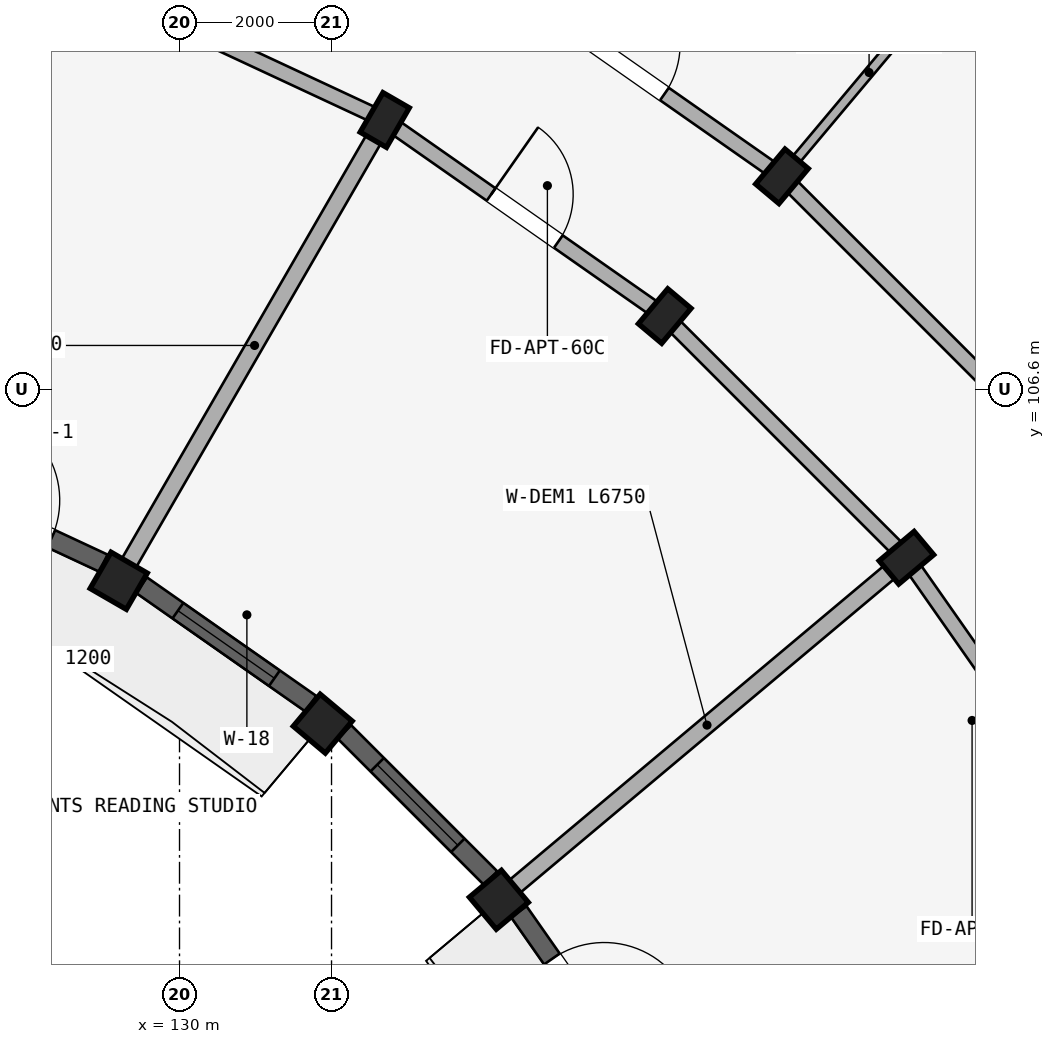
"""IFC4 building model, lengths in metres.
Left out: names, types, materials, properties, quantities, classifications, styles, units other than length and angle.
Written with IfcOpenShell. Run it as: python <this file> out.ifc"""

import sys

from ifc_helpers import new_model, si_unit, direction, frame, frame_2d, origin, origin_2d, place, context, subcontext, project, spatial, rectangle, extrude, element, fill, save


model = new_model("IFC4")
c1 = context("Model", 3, precision=1e-05, world=origin(), true_north=direction((0.0, 1.0)))
c2 = subcontext(c1, "Body", "Model", "MODEL_VIEW")
j1 = project(units=[si_unit("LENGTHUNIT", "METRE"), si_unit("PLANEANGLEUNIT", "RADIAN")], contexts=[c1])
p1 = place(None, origin())
s1 = spatial("IfcSite", under=j1, at=p1, CompositionType="ELEMENT")
p2 = place(p1, origin())
s2 = spatial("IfcBuilding", under=s1, at=p2, CompositionType="ELEMENT")
p3 = place(p2, frame((0.0, 0.0, 40.2)))
s3 = spatial("IfcBuildingStorey", under=s2, at=p3, CompositionType="ELEMENT", Elevation=40.2)
p4 = place(p3, frame((129.2, 104.081, 0.0), z_axis=(0.0, 0.0, 1.0), x_axis=(-0.866025403784, 0.5, 0.0)))
e1 = element("IfcColumn", 1, at=p4, inside=s3, PredefinedType="COLUMN", context=c2, shape_type="SweptSolid", body=[
    extrude(rectangle(XDim=0.55, YDim=0.55, at=origin_2d()), origin(), (0.0, 0.0, 1.0), 2.91),
])
p5 = place(p3, frame((132.7, 110.144, 0.0), z_axis=(0.0, 0.0, 1.0), x_axis=(-0.866025403784, 0.5, 0.0)))
e2 = element("IfcColumn", 2, at=p5, inside=s3, PredefinedType="COLUMN", context=c2, shape_type="SweptSolid", body=[
    extrude(rectangle(XDim=0.4, YDim=0.6, at=origin_2d()), origin(), (0.0, 0.0, 1.0), 2.91),
])
p6 = place(p3, frame((131.885, 102.202, 0.0), z_axis=(0.0, 0.0, 1.0), x_axis=(-0.766044443119, 0.642787609687, 0.0)))
e3 = element("IfcColumn", 3, at=p6, inside=s3, PredefinedType="COLUMN", context=c2, shape_type="SweptSolid", body=[
    extrude(rectangle(XDim=0.55, YDim=0.55, at=origin_2d()), origin(), (0.0, 0.0, 1.0), 2.91),
])
for number, where, z_axis, x_axis in (
    (4, (136.384, 107.564, 0.0), (0.0, 0.0, 1.0), (-0.766, 0.643, 0.0)),
    (5, (137.927, 109.402, 0.0), (0.0, 0.0, 1.0), (-0.766, 0.643, 0.0)),
):
    element("IfcColumn", number, at=place(p3, frame(where, z_axis=z_axis, x_axis=x_axis)), inside=s3, PredefinedType="COLUMN", context=c2, shape_type="SweptSolid", body=[
        extrude(rectangle(XDim=0.4, YDim=0.6, at=origin_2d()), origin(), (0.0, 0.0, 1.0), 2.91),
    ])
p7 = place(p3, frame((134.202, 99.885, 0.0), z_axis=(0.0, 0.0, 1.0), x_axis=(-0.642787609687, 0.766044443119, 0.0)))
e6 = element("IfcColumn", 6, at=p7, inside=s3, PredefinedType="COLUMN", context=c2, shape_type="SweptSolid", body=[
    extrude(rectangle(XDim=0.55, YDim=0.55, at=origin_2d()), origin(), (0.0, 0.0, 1.0), 2.91),
])
p8 = place(p3, frame((139.564, 104.384, 0.0), z_axis=(0.0, 0.0, 1.0), x_axis=(-0.642787609687, 0.766044443119, 0.0)))
e7 = element("IfcColumn", 7, at=p8, inside=s3, PredefinedType="COLUMN", context=c2, shape_type="SweptSolid", body=[
    extrude(rectangle(XDim=0.4, YDim=0.6, at=origin_2d()), origin(), (0.0, 0.0, 1.0), 2.91),
])
p9 = place(p3, frame((128.624, 112.044, 0.0), z_axis=(0.0, 0.0, 1.0), x_axis=(0.906307919131, -0.422617978463, 0.0)))
e8 = element("IfcWall", 8, at=p9, inside=s3, PredefinedType="STANDARD", context=c2, shape_type="SweptSolid", body=[
    extrude(rectangle(XDim=4.497, YDim=0.2, at=frame_2d((2.249, 0.0))), origin(), (0.0, 0.0, 1.0), 2.352),
])
p10 = place(p3, frame((132.7, 110.144, 0.0), z_axis=(0.0, 0.0, 1.0), x_axis=(0.819155404658, -0.573571637217, 0.0)))
e9 = element("IfcWall", 9, at=p10, inside=s3, PredefinedType="STANDARD", context=c2, shape_type="SweptSolid", body=[
    extrude(rectangle(XDim=4.497, YDim=0.2, at=frame_2d((2.249, 0.0))), origin(), (0.0, 0.0, 1.0), 2.352),
])
p11 = place(p10, frame((1.709, 0.0, 0.0)))
e10 = element("IfcOpeningElement", 10, at=p11, cuts=e9, PredefinedType="OPENING", context=c2, shape_type="SweptSolid", body=[
    extrude(rectangle(XDim=1.08, YDim=2.15, at=frame_2d((0.54, 1.075))), frame((0.0, 0.11, 0.0), z_axis=(0.0, -1.0, 0.0), x_axis=(1.0, 0.0, 0.0)), (0.0, 0.0, 1.0), 0.22),
])
p12 = place(p3, frame((133.9, 112.222, 0.0), z_axis=(0.0, 0.0, 1.0), x_axis=(0.819140911474, -0.573592335331, 0.0)))
e11 = element("IfcWall", 11, at=p12, inside=s3, PredefinedType="STANDARD", context=c2, shape_type="SweptSolid", body=[
    extrude(rectangle(XDim=4.916, YDim=0.2, at=frame_2d((2.458, 0.0))), origin(), (0.0, 0.0, 1.0), 2.352),
])
p13 = place(p12, frame((1.888, 0.0, 0.0)))
e12 = element("IfcOpeningElement", 12, at=p13, cuts=e11, PredefinedType="OPENING", context=c2, shape_type="SweptSolid", body=[
    extrude(rectangle(XDim=1.14, YDim=2.15, at=frame_2d((0.57, 1.075))), frame((0.0, 0.11, 0.0), z_axis=(0.0, -1.0, 0.0), x_axis=(1.0, 0.0, 0.0)), (0.0, 0.0, 1.0), 0.22),
])
p14 = place(p3, frame((136.384, 107.564, 0.0), z_axis=(0.0, 0.0, 1.0), x_axis=(0.707106781187, -0.707106781187, 0.0)))
e13 = element("IfcWall", 13, at=p14, inside=s3, PredefinedType="STANDARD", context=c2, shape_type="SweptSolid", body=[
    extrude(rectangle(XDim=4.497, YDim=0.2, at=frame_2d((2.249, 0.0))), origin(), (0.0, 0.0, 1.0), 2.352),
])
p15 = place(p3, frame((137.927, 109.402, 0.0), z_axis=(0.0, 0.0, 1.0), x_axis=(0.707106781187, -0.707106781187, 0.0)))
e14 = element("IfcWall", 14, at=p15, inside=s3, PredefinedType="STANDARD", context=c2, shape_type="SweptSolid", body=[
    extrude(rectangle(XDim=4.916, YDim=0.2, at=frame_2d((2.458, 0.0))), origin(), (0.0, 0.0, 1.0), 2.352),
])
p16 = place(p3, frame((139.564, 104.384, 0.0), z_axis=(0.0, 0.0, 1.0), x_axis=(0.573571637217, -0.819155404658, 0.0)))
e15 = element("IfcWall", 15, at=p16, inside=s3, PredefinedType="STANDARD", context=c2, shape_type="SweptSolid", body=[
    extrude(rectangle(XDim=4.497, YDim=0.2, at=frame_2d((2.249, 0.0))), origin(), (0.0, 0.0, 1.0), 2.352),
])
p17 = place(p16, frame((1.749, 0.0, 0.0)))
e16 = element("IfcOpeningElement", 16, at=p17, cuts=e15, PredefinedType="OPENING", context=c2, shape_type="SweptSolid", body=[
    extrude(rectangle(XDim=1.0, YDim=2.15, at=frame_2d((0.5, 1.075))), frame((0.0, 0.11, 0.0), z_axis=(0.0, -1.0, 0.0), x_axis=(1.0, 0.0, 0.0)), (0.0, 0.0, 1.0), 0.22),
])
p18 = place(p3, frame((129.3, 104.254, 0.0), z_axis=(0.0, 0.0, 1.0), x_axis=(0.499997969693, 0.866026575979, 0.0)))
e17 = element("IfcWall", 17, at=p18, inside=s3, PredefinedType="STANDARD", context=c2, shape_type="SweptSolid", body=[
    extrude(rectangle(XDim=6.75, YDim=0.22, at=frame_2d((3.375, 0.0))), origin(), (0.0, 0.0, 1.0), 2.352),
])
p19 = place(p3, frame((137.991, 109.479, 0.0), z_axis=(0.0, 0.0, 1.0), x_axis=(0.642771313427, 0.766058117009, 0.0)))
e18 = element("IfcWall", 18, at=p19, inside=s3, PredefinedType="PARTITIONING", context=c2, shape_type="SweptSolid", body=[
    extrude(rectangle(XDim=6.22, YDim=0.125, at=frame_2d((3.11, 0.0))), origin(), (0.0, 0.0, 1.0), 2.352),
])
p20 = place(p19, frame((4.45, 0.0, 0.0)))
e19 = element("IfcOpeningElement", 19, at=p20, cuts=e18, PredefinedType="OPENING", context=c2, shape_type="SweptSolid", body=[
    extrude(rectangle(XDim=0.8, YDim=2.1, at=frame_2d((0.4, 1.05))), frame((0.0, 0.073, 0.0), z_axis=(0.0, -1.0, 0.0), x_axis=(1.0, 0.0, 0.0)), (0.0, 0.0, 1.0), 0.145),
])
p21 = place(p3, frame((134.355, 100.013, 0.0), z_axis=(0.0, 0.0, 1.0), x_axis=(0.766046761698, 0.642784846501, 0.0)))
e20 = element("IfcWall", 20, at=p21, inside=s3, PredefinedType="STANDARD", context=c2, shape_type="SweptSolid", body=[
    extrude(rectangle(XDim=6.75, YDim=0.22, at=frame_2d((3.375, 0.0))), origin(), (0.0, 0.0, 1.0), 2.352),
])
p22 = place(p3, frame((126.535, 105.462, 0.0), z_axis=(0.0, 0.0, 1.0), x_axis=(0.906302358412, -0.422629903269, 0.0)))
e21 = element("IfcWall", 21, at=p22, inside=s3, PredefinedType="STANDARD", context=c2, shape_type="SweptSolid", body=[
    extrude(rectangle(XDim=2.72, YDim=0.25, at=frame_2d((1.36, 0.0))), origin(), (0.0, 0.0, 1.0), 2.452),
])
p23 = place(p22, frame((0.76, 0.0, 0.0)))
e22 = element("IfcOpeningElement", 22, at=p23, cuts=e21, PredefinedType="OPENING", context=c2, shape_type="SweptSolid", body=[
    extrude(rectangle(XDim=1.2, YDim=2.15, at=frame_2d((0.6, 1.075))), frame((0.0, 0.135, 0.0), z_axis=(0.0, -1.0, 0.0), x_axis=(1.0, 0.0, 0.0)), (0.0, 0.0, 1.0), 0.27),
])
p24 = place(p3, frame((129.5, 104.024, 0.0), z_axis=(0.0, 0.0, 1.0), x_axis=(0.819126475299, -0.573612950921, 0.0)))
e23 = element("IfcWall", 23, at=p24, inside=s3, PredefinedType="STANDARD", context=c2, shape_type="SweptSolid", body=[
    extrude(rectangle(XDim=2.72, YDim=0.25, at=frame_2d((1.36, 0.0))), origin(), (0.0, 0.0, 1.0), 2.452),
])
p25 = place(p24, frame((0.585, 0.0, 0.652)))
e24 = element("IfcOpeningElement", 24, at=p25, cuts=e23, PredefinedType="OPENING", context=c2, shape_type="SweptSolid", body=[
    extrude(rectangle(XDim=1.55, YDim=1.6, at=frame_2d((0.775, 0.8))), frame((0.0, 0.135, 0.0), z_axis=(0.0, -1.0, 0.0), x_axis=(1.0, 0.0, 0.0)), (0.0, 0.0, 1.0), 0.27),
])
p26 = place(p3, frame((132.17, 102.093, 0.0), z_axis=(0.0, 0.0, 1.0), x_axis=(0.707106781187, -0.707106781187, 0.0)))
e25 = element("IfcWall", 25, at=p26, inside=s3, PredefinedType="STANDARD", context=c2, shape_type="SweptSolid", body=[
    extrude(rectangle(XDim=2.72, YDim=0.25, at=frame_2d((1.36, 0.0))), origin(), (0.0, 0.0, 1.0), 2.452),
])
p27 = place(p26, frame((0.61, 0.0, 0.602)))
e26 = element("IfcOpeningElement", 26, at=p27, cuts=e25, PredefinedType="OPENING", context=c2, shape_type="SweptSolid", body=[
    extrude(rectangle(XDim=1.5, YDim=1.65, at=frame_2d((0.75, 0.825))), frame((0.0, 0.135, 0.0), z_axis=(0.0, -1.0, 0.0), x_axis=(1.0, 0.0, 0.0)), (0.0, 0.0, 1.0), 0.27),
])
p28 = place(p3, frame((134.464, 99.728, 0.0), z_axis=(0.0, 0.0, 1.0), x_axis=(0.573612950921, -0.819126475299, 0.0)))
e27 = element("IfcWall", 27, at=p28, inside=s3, PredefinedType="STANDARD", context=c2, shape_type="SweptSolid", body=[
    extrude(rectangle(XDim=2.72, YDim=0.25, at=frame_2d((1.36, 0.0))), origin(), (0.0, 0.0, 1.0), 2.452),
])
p29 = place(p28, frame((0.76, 0.0, 0.0)))
e28 = element("IfcOpeningElement", 28, at=p29, cuts=e27, PredefinedType="OPENING", context=c2, shape_type="SweptSolid", body=[
    extrude(rectangle(XDim=1.2, YDim=2.15, at=frame_2d((0.6, 1.075))), frame((0.0, 0.135, 0.0), z_axis=(0.0, -1.0, 0.0), x_axis=(1.0, 0.0, 0.0)), (0.0, 0.0, 1.0), 0.27),
])
p30 = place(p25, origin())
e29 = element("IfcWindow", 29, at=p30, inside=s3, PartitioningType="DOUBLE_PANEL_VERTICAL", PredefinedType="WINDOW", context=c2, shape_type="SweptSolid", body=[
    extrude(rectangle(XDim=1.55, YDim=1.6, at=frame_2d((0.775, 0.8))), frame((0.0, 0.03, 0.0), z_axis=(0.0, -1.0, 0.0), x_axis=(1.0, 0.0, 0.0)), (0.0, 0.0, 1.0), 0.06),
])
fill(e24, e29)
p31 = place(p27, origin())
e30 = element("IfcWindow", 30, at=p31, inside=s3, PartitioningType="DOUBLE_PANEL_VERTICAL", PredefinedType="WINDOW", context=c2, shape_type="SweptSolid", body=[
    extrude(rectangle(XDim=1.5, YDim=1.65, at=frame_2d((0.75, 0.825))), frame((0.0, 0.03, 0.0), z_axis=(0.0, -1.0, 0.0), x_axis=(1.0, 0.0, 0.0)), (0.0, 0.0, 1.0), 0.06),
])
fill(e26, e30)
p32 = place(p13, frame((1.14, 0.0, 0.0), z_axis=(0.0, 0.0, 1.0), x_axis=(-1.0, 0.0, 0.0)))
e31 = element("IfcDoor", 31, at=p32, inside=s3, OperationType="SINGLE_SWING_RIGHT", PredefinedType="DOOR", context=c2, shape_type="SweptSolid", body=[
    extrude(rectangle(XDim=1.14, YDim=2.15, at=frame_2d((0.57, 1.075))), frame((0.0, 0.025, 0.0), z_axis=(0.0, -1.0, 0.0), x_axis=(1.0, 0.0, 0.0)), (0.0, 0.0, 1.0), 0.05),
])
fill(e12, e31)
p33 = place(p11, frame((1.08, 0.0, 0.0), z_axis=(0.0, 0.0, 1.0), x_axis=(-1.0, 0.0, 0.0)))
e32 = element("IfcDoor", 32, at=p33, inside=s3, OperationType="SINGLE_SWING_RIGHT", PredefinedType="DOOR", context=c2, shape_type="SweptSolid", body=[
    extrude(rectangle(XDim=1.08, YDim=2.15, at=frame_2d((0.54, 1.075))), frame((0.0, 0.025, 0.0), z_axis=(0.0, -1.0, 0.0), x_axis=(1.0, 0.0, 0.0)), (0.0, 0.0, 1.0), 0.05),
])
fill(e10, e32)
p34 = place(p29, frame((1.2, 0.0, 0.0), z_axis=(0.0, 0.0, 1.0), x_axis=(-1.0, 0.0, 0.0)))
e33 = element("IfcDoor", 33, at=p34, inside=s3, OperationType="SINGLE_SWING_LEFT", PredefinedType="DOOR", context=c2, shape_type="SweptSolid", body=[
    extrude(rectangle(XDim=1.2, YDim=2.15, at=frame_2d((0.6, 1.075))), frame((0.0, 0.025, 0.0), z_axis=(0.0, -1.0, 0.0), x_axis=(1.0, 0.0, 0.0)), (0.0, 0.0, 1.0), 0.05),
])
fill(e28, e33)
save(model, sys.argv[1])
